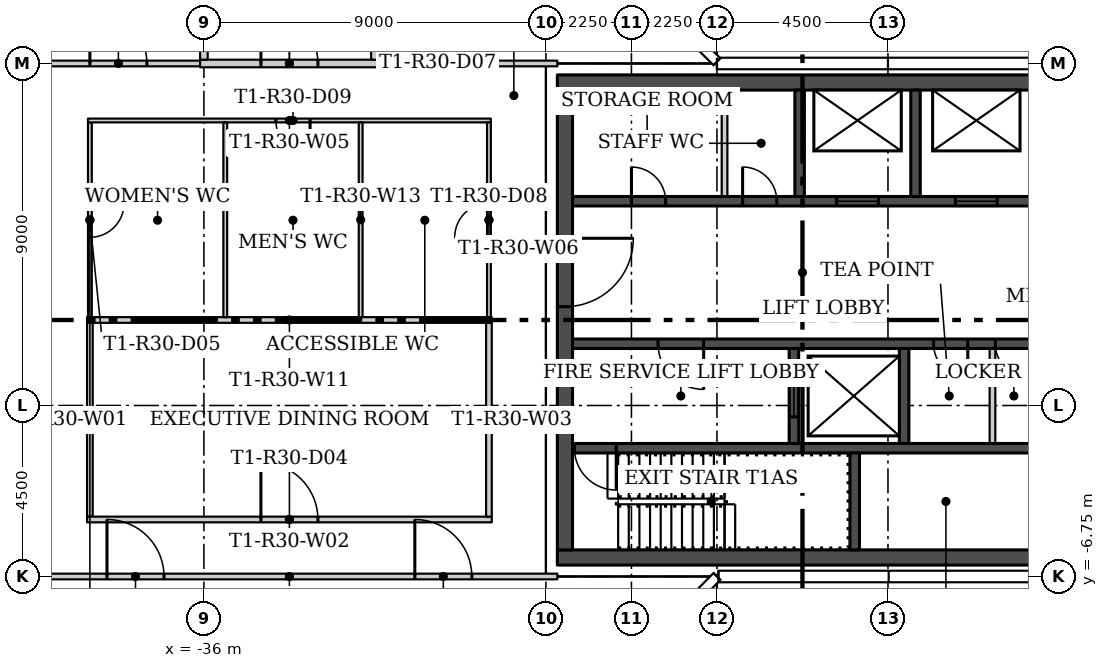
"""IFC4 building model, lengths in metres.
Left out: names, types, materials, properties, quantities, classifications, styles, units other than length and angle.
Written with IfcOpenShell. Run it as: python <this file> out.ifc"""

import sys

from ifc_helpers import new_model, si_unit, direction, frame, frame_2d, origin, place, context, subcontext, project, spatial, rectangle, extrude, element, fill, save


model = new_model("IFC4")
c1 = context("Model", 3, precision=1e-05, world=origin(), true_north=direction((0.0, 1.0)))
c2 = subcontext(c1, "Body", "Model", "MODEL_VIEW")
j1 = project(units=[si_unit("LENGTHUNIT", "METRE"), si_unit("PLANEANGLEUNIT", "RADIAN")], contexts=[c1])
p1 = place(None, origin())
s1 = spatial("IfcSite", under=j1, at=p1, CompositionType="ELEMENT")
p2 = place(p1, origin())
s2 = spatial("IfcBuilding", under=s1, at=p2, CompositionType="ELEMENT")
p3 = place(p2, frame((0.0, 0.0, 269.4)))
s3 = spatial("IfcBuildingStorey", under=s2, at=p3, CompositionType="ELEMENT", Elevation=269.4)
p4 = place(p3, frame((-39.0, -0.075, 0.0), z_axis=(0.0, 0.0, 1.0), x_axis=(0.0, -1.0, 0.0)))
e1 = element("IfcWall", 1, at=p4, inside=s3, PredefinedType="PARTITIONING", context=c2, shape_type="SweptSolid", body=[
    extrude(rectangle(XDim=5.1, YDim=0.15, at=frame_2d((2.55, 0.0))), origin(), (0.0, 0.0, 1.0), 3.45),
])
p5 = place(p3, frame((-39.075, -5.25, 0.0)))
e2 = element("IfcWall", 2, at=p5, inside=s3, PredefinedType="PARTITIONING", context=c2, shape_type="SweptSolid", body=[
    extrude(rectangle(XDim=10.65, YDim=0.15, at=frame_2d((5.325, 0.0))), origin(), (0.0, 0.0, 1.0), 3.45),
])
p6 = place(p5, frame((4.575, 0.0, 0.0)))
e3 = element("IfcOpeningElement", 3, at=p6, cuts=e2, PredefinedType="OPENING", context=c2, shape_type="SweptSolid", body=[
    extrude(rectangle(XDim=1.5, YDim=2.1, at=frame_2d((0.75, 1.05))), frame((0.0, 0.085, 0.0), z_axis=(0.0, -1.0, 0.0), x_axis=(1.0, 0.0, 0.0)), (0.0, 0.0, 1.0), 0.17),
])
p7 = place(p3, frame((-28.5, -5.175, 0.0), z_axis=(0.0, 0.0, 1.0), x_axis=(0.0, 1.0, 0.0)))
e4 = element("IfcWall", 4, at=p7, inside=s3, PredefinedType="PARTITIONING", context=c2, shape_type="SweptSolid", body=[
    extrude(rectangle(XDim=5.1, YDim=0.15, at=frame_2d((2.55, 0.0))), origin(), (0.0, 0.0, 1.0), 3.45),
])
p8 = place(p3, frame((-39.0, 5.2, 0.0), z_axis=(0.0, 0.0, 1.0), x_axis=(0.0, -1.0, 0.0)))
e5 = element("IfcWall", 5, at=p8, inside=s3, PredefinedType="PARTITIONING", context=c2, shape_type="SweptSolid", body=[
    extrude(rectangle(XDim=5.125, YDim=0.1, at=frame_2d((2.562, 0.0))), origin(), (0.0, 0.0, 1.0), 3.45),
])
p9 = place(p8, frame((2.125, 0.0, 0.0)))
e6 = element("IfcOpeningElement", 6, at=p9, cuts=e5, PredefinedType="OPENING", context=c2, shape_type="SweptSolid", body=[
    extrude(rectangle(XDim=0.9, YDim=2.1, at=frame_2d((0.45, 1.05))), frame((0.0, 0.06, 0.0), z_axis=(0.0, -1.0, 0.0), x_axis=(1.0, 0.0, 0.0)), (0.0, 0.0, 1.0), 0.12),
])
p10 = place(p3, frame((-28.45, 5.25, 0.0), z_axis=(0.0, 0.0, 1.0), x_axis=(-1.0, 0.0, 0.0)))
e7 = element("IfcWall", 7, at=p10, inside=s3, PredefinedType="PARTITIONING", context=c2, shape_type="SweptSolid", body=[
    extrude(rectangle(XDim=10.6, YDim=0.1, at=frame_2d((5.3, 0.0))), origin(), (0.0, 0.0, 1.0), 3.45),
])
p11 = place(p10, frame((4.756, 0.0, 0.0)))
e8 = element("IfcOpeningElement", 8, at=p11, cuts=e7, PredefinedType="OPENING", context=c2, shape_type="SweptSolid", body=[
    extrude(rectangle(XDim=0.9, YDim=2.1, at=frame_2d((0.45, 1.05))), frame((0.0, 0.06, 0.0), z_axis=(0.0, -1.0, 0.0), x_axis=(1.0, 0.0, 0.0)), (0.0, 0.0, 1.0), 0.12),
])
p12 = place(p3, frame((-28.5, 0.075, 0.0), z_axis=(0.0, 0.0, 1.0), x_axis=(0.0, 1.0, 0.0)))
e9 = element("IfcWall", 9, at=p12, inside=s3, PredefinedType="PARTITIONING", context=c2, shape_type="SweptSolid", body=[
    extrude(rectangle(XDim=5.125, YDim=0.1, at=frame_2d((2.562, 0.0))), origin(), (0.0, 0.0, 1.0), 3.45),
])
p13 = place(p12, frame((2.1, 0.0, 0.0)))
e10 = element("IfcOpeningElement", 10, at=p13, cuts=e9, PredefinedType="OPENING", context=c2, shape_type="SweptSolid", body=[
    extrude(rectangle(XDim=0.9, YDim=2.1, at=frame_2d((0.45, 1.05))), frame((0.0, 0.06, 0.0), z_axis=(0.0, -1.0, 0.0), x_axis=(1.0, 0.0, 0.0)), (0.0, 0.0, 1.0), 0.12),
])
p14 = place(p3, frame((-40.8, 6.75, 0.0)))
e11 = element("IfcWall", 11, at=p14, inside=s3, PredefinedType="PARTITIONING", context=c2, shape_type="SweptSolid", body=[
    extrude(rectangle(XDim=4.9, YDim=0.15, at=frame_2d((2.45, 0.0))), origin(), (0.0, 0.0, 1.0), 3.45),
])
p15 = place(p14, frame((1.8, 0.0, 0.0)))
e12 = element("IfcOpeningElement", 12, at=p15, cuts=e11, PredefinedType="OPENING", context=c2, shape_type="SweptSolid", body=[
    extrude(rectangle(XDim=1.5, YDim=2.1, at=frame_2d((0.75, 1.05))), frame((0.0, 0.085, 0.0), z_axis=(0.0, -1.0, 0.0), x_axis=(1.0, 0.0, 0.0)), (0.0, 0.0, 1.0), 0.17),
])
p16 = place(p3, frame((-31.6, 6.75, 0.0)))
e13 = element("IfcWall", 13, at=p16, inside=s3, PredefinedType="PARTITIONING", context=c2, shape_type="SweptSolid", body=[
    extrude(rectangle(XDim=4.9, YDim=0.15, at=frame_2d((2.45, 0.0))), origin(), (0.0, 0.0, 1.0), 3.45),
])
p17 = place(p16, frame((1.85, 0.0, 0.0)))
e14 = element("IfcOpeningElement", 14, at=p17, cuts=e13, PredefinedType="OPENING", context=c2, shape_type="SweptSolid", body=[
    extrude(rectangle(XDim=1.0, YDim=2.4, at=frame_2d((0.5, 1.2))), frame((0.0, 0.085, 0.0), z_axis=(0.0, -1.0, 0.0), x_axis=(1.0, 0.0, 0.0)), (0.0, 0.0, 1.0), 0.17),
])
p18 = place(p3, frame((-36.1, 6.75, 0.0)))
e15 = element("IfcWall", 15, at=p18, inside=s3, PredefinedType="PARTITIONING", context=c2, shape_type="SweptSolid", body=[
    extrude(rectangle(XDim=4.7, YDim=0.2, at=frame_2d((2.35, 0.0))), origin(), (0.0, 0.0, 1.0), 3.45),
])
p19 = place(p18, frame((1.6, 0.0, 0.0)))
e16 = element("IfcOpeningElement", 16, at=p19, cuts=e15, PredefinedType="OPENING", context=c2, shape_type="SweptSolid", body=[
    extrude(rectangle(XDim=1.5, YDim=2.4, at=frame_2d((0.75, 1.2))), frame((0.0, 0.11, 0.0), z_axis=(0.0, -1.0, 0.0), x_axis=(1.0, 0.0, 0.0)), (0.0, 0.0, 1.0), 0.22),
])
p20 = place(p3, frame((-40.8, -6.75, 0.0)))
e17 = element("IfcWall", 17, at=p20, inside=s3, PredefinedType="PARTITIONING", context=c2, shape_type="SweptSolid", body=[
    extrude(rectangle(XDim=14.1, YDim=0.15, at=frame_2d((7.05, 0.0))), origin(), (0.0, 0.0, 1.0), 3.45),
])
p21 = place(p20, frame((2.25, 0.0, 0.0)))
e18 = element("IfcOpeningElement", 18, at=p21, cuts=e17, PredefinedType="OPENING", context=c2, shape_type="SweptSolid", body=[
    extrude(rectangle(XDim=1.5, YDim=2.1, at=frame_2d((0.75, 1.05))), frame((0.0, 0.085, 0.0), z_axis=(0.0, -1.0, 0.0), x_axis=(1.0, 0.0, 0.0)), (0.0, 0.0, 1.0), 0.17),
])
p22 = place(p20, frame((10.35, 0.0, 0.0)))
e19 = element("IfcOpeningElement", 19, at=p22, cuts=e17, PredefinedType="OPENING", context=c2, shape_type="SweptSolid", body=[
    extrude(rectangle(XDim=1.5, YDim=2.1, at=frame_2d((0.75, 1.05))), frame((0.0, 0.085, 0.0), z_axis=(0.0, -1.0, 0.0), x_axis=(1.0, 0.0, 0.0)), (0.0, 0.0, 1.0), 0.17),
])
p23 = place(p3, frame((-28.425, 0.0, 0.0), z_axis=(0.0, 0.0, 1.0), x_axis=(-1.0, 0.0, 0.0)))
e20 = element("IfcWall", 20, at=p23, inside=s3, PredefinedType="PARTITIONING", context=c2, shape_type="SweptSolid", body=[
    extrude(rectangle(XDim=10.65, YDim=0.15, at=frame_2d((5.325, 0.0))), origin(), (0.0, 0.0, 1.0), 3.45),
])
for number, where, z_axis, x_axis in (
    (21, (-35.438, 0.075, 0.0), (0.0, 0.0, 1.0), (0.0, 1.0, 0.0)),
    (22, (-31.875, 0.075, 0.0), (0.0, 0.0, 1.0), (0.0, 1.0, 0.0)),
):
    element("IfcWall", number, at=place(p3, frame(where, z_axis=z_axis, x_axis=x_axis)), inside=s3, PredefinedType="PARTITIONING", context=c2, shape_type="SweptSolid", body=[
        extrude(rectangle(XDim=5.125, YDim=0.1, at=frame_2d((2.562, 0.0))), origin(), (0.0, 0.0, 1.0), 3.45),
    ])
for number, where, z_axis, x_axis in (
    (23, (-36.0, 6.85, 0.0), (0.0, 0.0, 1.0), (0.0, 1.0, 0.0)),
    (24, (-31.5, 6.85, 0.0), (0.0, 0.0, 1.0), (0.0, 1.0, 0.0)),
):
    element("IfcWall", number, at=place(p3, frame(where, z_axis=z_axis, x_axis=x_axis)), inside=s3, PredefinedType="PARTITIONING", context=c2, shape_type="SweptSolid", body=[
        extrude(rectangle(XDim=8.805, YDim=0.2, at=frame_2d((4.402, 0.0))), origin(), (0.0, 0.0, 1.0), 3.45),
    ])
for number, where in (
    (25, (-26.7, -6.25, 0.0)),
    (26, (-26.7, 6.25, 0.0)),
):
    element("IfcWall", number, at=place(p3, frame(where)), inside=s3, PredefinedType="SHEAR", context=c2, shape_type="SweptSolid", body=[
        extrude(rectangle(XDim=12.9, YDim=0.4, at=frame_2d((6.45, 0.0))), origin(), (0.0, 0.0, 1.0), 3.45),
    ])
p24 = place(p3, frame((-26.5, 6.05, 0.0), z_axis=(0.0, 0.0, 1.0), x_axis=(0.0, -1.0, 0.0)))
e27 = element("IfcWall", 27, at=p24, inside=s3, PredefinedType="SHEAR", context=c2, shape_type="SweptSolid", body=[
    extrude(rectangle(XDim=12.1, YDim=0.4, at=frame_2d((6.05, 0.0))), origin(), (0.0, 0.0, 1.0), 3.45),
])
p25 = place(p24, frame((3.9, 0.0, 0.0)))
e28 = element("IfcOpeningElement", 28, at=p25, cuts=e27, PredefinedType="OPENING", context=c2, shape_type="SweptSolid", body=[
    extrude(rectangle(XDim=1.8, YDim=2.4, at=frame_2d((0.9, 1.2))), frame((0.0, 0.21, 0.0), z_axis=(0.0, -1.0, 0.0), x_axis=(1.0, 0.0, 0.0)), (0.0, 0.0, 1.0), 0.42),
])
p26 = place(p3, frame((-14.2, -3.375, 0.0), z_axis=(0.0, 0.0, 1.0), x_axis=(-1.0, 0.0, 0.0)))
e29 = element("IfcWall", 29, at=p26, inside=s3, PredefinedType="SHEAR", context=c2, shape_type="SweptSolid", body=[
    extrude(rectangle(XDim=12.1, YDim=0.25, at=frame_2d((6.05, 0.0))), origin(), (0.0, 0.0, 1.0), 3.45),
])
p27 = place(p26, frame((10.95, 0.0, 0.0)))
e30 = element("IfcOpeningElement", 30, at=p27, cuts=e29, PredefinedType="OPENING", context=c2, shape_type="SweptSolid", body=[
    extrude(rectangle(XDim=1.1, YDim=2.1, at=frame_2d((0.55, 1.05))), frame((0.0, 0.135, 0.0), z_axis=(0.0, -1.0, 0.0), x_axis=(1.0, 0.0, 0.0)), (0.0, 0.0, 1.0), 0.27),
])
p28 = place(p3, frame((-18.875, -6.05, 0.0), z_axis=(0.0, 0.0, 1.0), x_axis=(0.0, 1.0, 0.0)))
e31 = element("IfcWall", 31, at=p28, inside=s3, PredefinedType="SHEAR", context=c2, shape_type="SweptSolid", body=[
    extrude(rectangle(XDim=2.55, YDim=0.25, at=frame_2d((1.275, 0.0))), origin(), (0.0, 0.0, 1.0), 3.45),
])
p29 = place(p3, frame((-14.2, -0.625, 0.0), z_axis=(0.0, 0.0, 1.0), x_axis=(-1.0, 0.0, 0.0)))
e32 = element("IfcWall", 32, at=p29, inside=s3, PredefinedType="SHEAR", context=c2, shape_type="SweptSolid", body=[
    extrude(rectangle(XDim=12.1, YDim=0.25, at=frame_2d((6.05, 0.0))), origin(), (0.0, 0.0, 1.0), 3.45),
])
p30 = place(p29, frame((8.65, 0.0, 0.0)))
e33 = element("IfcOpeningElement", 33, at=p30, cuts=e32, PredefinedType="OPENING", context=c2, shape_type="SweptSolid", body=[
    extrude(rectangle(XDim=1.2, YDim=2.1, at=frame_2d((0.6, 1.05))), frame((0.0, 0.135, 0.0), z_axis=(0.0, -1.0, 0.0), x_axis=(1.0, 0.0, 0.0)), (0.0, 0.0, 1.0), 0.27),
])
p31 = place(p29, frame((1.7, 0.0, 0.0)))
e34 = element("IfcOpeningElement", 34, at=p31, cuts=e32, PredefinedType="OPENING", context=c2, shape_type="SweptSolid", body=[
    extrude(rectangle(XDim=0.9, YDim=2.1, at=frame_2d((0.45, 1.05))), frame((0.0, 0.135, 0.0), z_axis=(0.0, -1.0, 0.0), x_axis=(1.0, 0.0, 0.0)), (0.0, 0.0, 1.0), 0.27),
])
p32 = place(p29, frame((0.075, 0.0, 0.0)))
e35 = element("IfcOpeningElement", 35, at=p32, cuts=e32, PredefinedType="OPENING", context=c2, shape_type="SweptSolid", body=[
    extrude(rectangle(XDim=0.9, YDim=2.1, at=frame_2d((0.45, 1.05))), frame((0.0, 0.135, 0.0), z_axis=(0.0, -1.0, 0.0), x_axis=(1.0, 0.0, 0.0)), (0.0, 0.0, 1.0), 0.27),
])
p33 = place(p3, frame((-20.475, -3.25, 0.0), z_axis=(0.0, 0.0, 1.0), x_axis=(0.0, 1.0, 0.0)))
e36 = element("IfcWall", 36, at=p33, inside=s3, PredefinedType="SHEAR", context=c2, shape_type="SweptSolid", body=[
    extrude(rectangle(XDim=2.5, YDim=0.25, at=frame_2d((1.25, 0.0))), origin(), (0.0, 0.0, 1.0), 3.45),
])
p34 = place(p33, frame((0.7, 0.0, 0.0)))
e37 = element("IfcOpeningElement", 37, at=p34, cuts=e36, PredefinedType="OPENING", context=c2, shape_type="SweptSolid", body=[
    extrude(rectangle(XDim=1.1, YDim=2.1, at=frame_2d((0.55, 1.05))), frame((0.0, 0.135, 0.0), z_axis=(0.0, -1.0, 0.0), x_axis=(1.0, 0.0, 0.0)), (0.0, 0.0, 1.0), 0.27),
])
p35 = place(p3, frame((-17.575, -3.25, 0.0), z_axis=(0.0, 0.0, 1.0), x_axis=(0.0, 1.0, 0.0)))
e38 = element("IfcWall", 38, at=p35, inside=s3, PredefinedType="SHEAR", context=c2, shape_type="SweptSolid", body=[
    extrude(rectangle(XDim=2.5, YDim=0.25, at=frame_2d((1.25, 0.0))), origin(), (0.0, 0.0, 1.0), 3.45),
])
p36 = place(p3, frame((-15.25, -3.25, 0.0), z_axis=(0.0, 0.0, 1.0), x_axis=(0.0, 1.0, 0.0)))
e39 = element("IfcWall", 39, at=p36, inside=s3, PredefinedType="PARTITIONING", context=c2, shape_type="SweptSolid", body=[
    extrude(rectangle(XDim=2.5, YDim=0.15, at=frame_2d((1.25, 0.0))), origin(), (0.0, 0.0, 1.0), 3.45),
])
p37 = place(p3, frame((-26.3, 3.125, 0.0)))
e40 = element("IfcWall", 40, at=p37, inside=s3, PredefinedType="SHEAR", context=c2, shape_type="SweptSolid", body=[
    extrude(rectangle(XDim=12.1, YDim=0.25, at=frame_2d((6.05, 0.0))), origin(), (0.0, 0.0, 1.0), 3.45),
])
p38 = place(p37, frame((6.95, 0.0, 0.0)))
e41 = element("IfcOpeningElement", 41, at=p38, cuts=e40, PredefinedType="OPENING", context=c2, shape_type="SweptSolid", body=[
    extrude(rectangle(XDim=1.1, YDim=2.1, at=frame_2d((0.55, 1.05))), frame((0.0, 0.135, 0.0), z_axis=(0.0, -1.0, 0.0), x_axis=(1.0, 0.0, 0.0)), (0.0, 0.0, 1.0), 0.27),
])
p39 = place(p37, frame((10.075, 0.0, 0.0)))
e42 = element("IfcOpeningElement", 42, at=p39, cuts=e40, PredefinedType="OPENING", context=c2, shape_type="SweptSolid", body=[
    extrude(rectangle(XDim=1.1, YDim=2.1, at=frame_2d((0.55, 1.05))), frame((0.0, 0.135, 0.0), z_axis=(0.0, -1.0, 0.0), x_axis=(1.0, 0.0, 0.0)), (0.0, 0.0, 1.0), 0.27),
])
p40 = place(p37, frame((1.55, 0.0, 0.0)))
e43 = element("IfcOpeningElement", 43, at=p40, cuts=e40, PredefinedType="OPENING", context=c2, shape_type="SweptSolid", body=[
    extrude(rectangle(XDim=0.9, YDim=2.1, at=frame_2d((0.45, 1.05))), frame((0.0, 0.135, 0.0), z_axis=(0.0, -1.0, 0.0), x_axis=(1.0, 0.0, 0.0)), (0.0, 0.0, 1.0), 0.27),
])
p41 = place(p37, frame((4.475, 0.0, 0.0)))
e44 = element("IfcOpeningElement", 44, at=p41, cuts=e40, PredefinedType="OPENING", context=c2, shape_type="SweptSolid", body=[
    extrude(rectangle(XDim=0.9, YDim=2.1, at=frame_2d((0.45, 1.05))), frame((0.0, 0.135, 0.0), z_axis=(0.0, -1.0, 0.0), x_axis=(1.0, 0.0, 0.0)), (0.0, 0.0, 1.0), 0.27),
])
for number, where, z_axis, x_axis in (
    (45, (-20.325, 3.25, 0.0), (0.0, 0.0, 1.0), (0.0, 1.0, 0.0)),
    (46, (-17.275, 3.25, 0.0), (0.0, 0.0, 1.0), (0.0, 1.0, 0.0)),
):
    element("IfcWall", number, at=place(p3, frame(where, z_axis=z_axis, x_axis=x_axis)), inside=s3, PredefinedType="SHEAR", context=c2, shape_type="SweptSolid", body=[
        extrude(rectangle(XDim=2.8, YDim=0.25, at=frame_2d((1.4, 0.0))), origin(), (0.0, 0.0, 1.0), 3.45),
    ])
p42 = place(p3, frame((-22.3, 3.25, 0.0), z_axis=(0.0, 0.0, 1.0), x_axis=(0.0, 1.0, 0.0)))
e47 = element("IfcWall", 47, at=p42, inside=s3, PredefinedType="PARTITIONING", context=c2, shape_type="SweptSolid", body=[
    extrude(rectangle(XDim=2.8, YDim=0.15, at=frame_2d((1.4, 0.0))), origin(), (0.0, 0.0, 1.0), 3.45),
])
p43 = place(p21, origin())
e48 = element("IfcDoor", 48, at=p43, inside=s3, OperationType="DOUBLE_DOOR_SINGLE_SWING", PredefinedType="DOOR", context=c2, shape_type="SweptSolid", body=[
    extrude(rectangle(XDim=1.5, YDim=2.1, at=frame_2d((0.75, 1.05))), frame((0.0, 0.025, 0.0), z_axis=(0.0, -1.0, 0.0), x_axis=(1.0, 0.0, 0.0)), (0.0, 0.0, 1.0), 0.05),
])
fill(e18, e48)
p44 = place(p22, origin())
e49 = element("IfcDoor", 49, at=p44, inside=s3, OperationType="DOUBLE_DOOR_SINGLE_SWING", PredefinedType="DOOR", context=c2, shape_type="SweptSolid", body=[
    extrude(rectangle(XDim=1.5, YDim=2.1, at=frame_2d((0.75, 1.05))), frame((0.0, 0.025, 0.0), z_axis=(0.0, -1.0, 0.0), x_axis=(1.0, 0.0, 0.0)), (0.0, 0.0, 1.0), 0.05),
])
fill(e19, e49)
p45 = place(p15, origin())
e50 = element("IfcDoor", 50, at=p45, inside=s3, OperationType="DOUBLE_DOOR_SINGLE_SWING", PredefinedType="DOOR", context=c2, shape_type="SweptSolid", body=[
    extrude(rectangle(XDim=1.5, YDim=2.1, at=frame_2d((0.75, 1.05))), frame((0.0, 0.025, 0.0), z_axis=(0.0, -1.0, 0.0), x_axis=(1.0, 0.0, 0.0)), (0.0, 0.0, 1.0), 0.05),
])
fill(e12, e50)
p46 = place(p6, origin())
e51 = element("IfcDoor", 51, at=p46, inside=s3, OperationType="DOUBLE_DOOR_SINGLE_SWING", PredefinedType="DOOR", context=c2, shape_type="SweptSolid", body=[
    extrude(rectangle(XDim=1.5, YDim=2.1, at=frame_2d((0.75, 1.05))), frame((0.0, 0.025, 0.0), z_axis=(0.0, -1.0, 0.0), x_axis=(1.0, 0.0, 0.0)), (0.0, 0.0, 1.0), 0.05),
])
fill(e3, e51)
p47 = place(p9, origin())
e52 = element("IfcDoor", 52, at=p47, inside=s3, OperationType="SINGLE_SWING_LEFT", PredefinedType="DOOR", context=c2, shape_type="SweptSolid", body=[
    extrude(rectangle(XDim=0.9, YDim=2.1, at=frame_2d((0.45, 1.05))), frame((0.0, 0.025, 0.0), z_axis=(0.0, -1.0, 0.0), x_axis=(1.0, 0.0, 0.0)), (0.0, 0.0, 1.0), 0.05),
])
fill(e6, e52)
p48 = place(p19, origin())
e53 = element("IfcDoor", 53, at=p48, inside=s3, OperationType="DOUBLE_DOOR_SINGLE_SWING", PredefinedType="DOOR", context=c2, shape_type="SweptSolid", body=[
    extrude(rectangle(XDim=1.5, YDim=2.4, at=frame_2d((0.75, 1.2))), frame((0.0, 0.025, 0.0), z_axis=(0.0, -1.0, 0.0), x_axis=(1.0, 0.0, 0.0)), (0.0, 0.0, 1.0), 0.05),
])
fill(e16, e53)
p49 = place(p17, origin())
e54 = element("IfcDoor", 54, at=p49, inside=s3, OperationType="SINGLE_SWING_RIGHT", PredefinedType="DOOR", context=c2, shape_type="SweptSolid", body=[
    extrude(rectangle(XDim=1.0, YDim=2.4, at=frame_2d((0.5, 1.2))), frame((0.0, 0.025, 0.0), z_axis=(0.0, -1.0, 0.0), x_axis=(1.0, 0.0, 0.0)), (0.0, 0.0, 1.0), 0.05),
])
fill(e14, e54)
p50 = place(p13, origin())
e55 = element("IfcDoor", 55, at=p50, inside=s3, OperationType="SINGLE_SWING_RIGHT", PredefinedType="DOOR", context=c2, shape_type="SweptSolid", body=[
    extrude(rectangle(XDim=0.9, YDim=2.1, at=frame_2d((0.45, 1.05))), frame((0.0, 0.025, 0.0), z_axis=(0.0, -1.0, 0.0), x_axis=(1.0, 0.0, 0.0)), (0.0, 0.0, 1.0), 0.05),
])
fill(e10, e55)
p51 = place(p11, origin())
e56 = element("IfcDoor", 56, at=p51, inside=s3, OperationType="SINGLE_SWING_LEFT", PredefinedType="DOOR", context=c2, shape_type="SweptSolid", body=[
    extrude(rectangle(XDim=0.9, YDim=2.1, at=frame_2d((0.45, 1.05))), frame((0.0, 0.025, 0.0), z_axis=(0.0, -1.0, 0.0), x_axis=(1.0, 0.0, 0.0)), (0.0, 0.0, 1.0), 0.05),
])
fill(e8, e56)
p52 = place(p25, origin())
e57 = element("IfcDoor", 57, at=p52, inside=s3, OperationType="DOUBLE_DOOR_SINGLE_SWING", PredefinedType="DOOR", context=c2, shape_type="SweptSolid", body=[
    extrude(rectangle(XDim=1.8, YDim=2.4, at=frame_2d((0.9, 1.2))), frame((0.0, 0.025, 0.0), z_axis=(0.0, -1.0, 0.0), x_axis=(1.0, 0.0, 0.0)), (0.0, 0.0, 1.0), 0.05),
])
fill(e28, e57)
p53 = place(p27, origin())
e58 = element("IfcDoor", 58, at=p53, inside=s3, OperationType="SINGLE_SWING_RIGHT", PredefinedType="DOOR", context=c2, shape_type="SweptSolid", body=[
    extrude(rectangle(XDim=1.1, YDim=2.1, at=frame_2d((0.55, 1.05))), frame((0.0, 0.025, 0.0), z_axis=(0.0, -1.0, 0.0), x_axis=(1.0, 0.0, 0.0)), (0.0, 0.0, 1.0), 0.05),
])
fill(e30, e58)
p54 = place(p30, origin())
e59 = element("IfcDoor", 59, at=p54, inside=s3, OperationType="SINGLE_SWING_RIGHT", PredefinedType="DOOR", context=c2, shape_type="SweptSolid", body=[
    extrude(rectangle(XDim=1.2, YDim=2.1, at=frame_2d((0.6, 1.05))), frame((0.0, 0.025, 0.0), z_axis=(0.0, -1.0, 0.0), x_axis=(1.0, 0.0, 0.0)), (0.0, 0.0, 1.0), 0.05),
])
fill(e33, e59)
p55 = place(p31, origin())
e60 = element("IfcDoor", 60, at=p55, inside=s3, OperationType="SINGLE_SWING_LEFT", PredefinedType="DOOR", context=c2, shape_type="SweptSolid", body=[
    extrude(rectangle(XDim=0.9, YDim=2.1, at=frame_2d((0.45, 1.05))), frame((0.0, 0.025, 0.0), z_axis=(0.0, -1.0, 0.0), x_axis=(1.0, 0.0, 0.0)), (0.0, 0.0, 1.0), 0.05),
])
fill(e34, e60)
p56 = place(p32, origin())
e61 = element("IfcDoor", 61, at=p56, inside=s3, OperationType="SINGLE_SWING_LEFT", PredefinedType="DOOR", context=c2, shape_type="SweptSolid", body=[
    extrude(rectangle(XDim=0.9, YDim=2.1, at=frame_2d((0.45, 1.05))), frame((0.0, 0.025, 0.0), z_axis=(0.0, -1.0, 0.0), x_axis=(1.0, 0.0, 0.0)), (0.0, 0.0, 1.0), 0.05),
])
fill(e35, e61)
p57 = place(p34, origin())
e62 = element("IfcDoor", 62, at=p57, inside=s3, OperationType="SLIDING_TO_LEFT", PredefinedType="DOOR", context=c2, shape_type="SweptSolid", body=[
    extrude(rectangle(XDim=1.1, YDim=2.1, at=frame_2d((0.55, 1.05))), frame((0.0, 0.025, 0.0), z_axis=(0.0, -1.0, 0.0), x_axis=(1.0, 0.0, 0.0)), (0.0, 0.0, 1.0), 0.05),
])
fill(e37, e62)
p58 = place(p38, origin())
e63 = element("IfcDoor", 63, at=p58, inside=s3, OperationType="SLIDING_TO_LEFT", PredefinedType="DOOR", context=c2, shape_type="SweptSolid", body=[
    extrude(rectangle(XDim=1.1, YDim=2.1, at=frame_2d((0.55, 1.05))), frame((0.0, 0.025, 0.0), z_axis=(0.0, -1.0, 0.0), x_axis=(1.0, 0.0, 0.0)), (0.0, 0.0, 1.0), 0.05),
])
fill(e41, e63)
p59 = place(p39, origin())
e64 = element("IfcDoor", 64, at=p59, inside=s3, OperationType="SLIDING_TO_LEFT", PredefinedType="DOOR", context=c2, shape_type="SweptSolid", body=[
    extrude(rectangle(XDim=1.1, YDim=2.1, at=frame_2d((0.55, 1.05))), frame((0.0, 0.025, 0.0), z_axis=(0.0, -1.0, 0.0), x_axis=(1.0, 0.0, 0.0)), (0.0, 0.0, 1.0), 0.05),
])
fill(e42, e64)
p60 = place(p40, origin())
e65 = element("IfcDoor", 65, at=p60, inside=s3, OperationType="SINGLE_SWING_LEFT", PredefinedType="DOOR", context=c2, shape_type="SweptSolid", body=[
    extrude(rectangle(XDim=0.9, YDim=2.1, at=frame_2d((0.45, 1.05))), frame((0.0, 0.025, 0.0), z_axis=(0.0, -1.0, 0.0), x_axis=(1.0, 0.0, 0.0)), (0.0, 0.0, 1.0), 0.05),
])
fill(e43, e65)
p61 = place(p41, origin())
e66 = element("IfcDoor", 66, at=p61, inside=s3, OperationType="SINGLE_SWING_LEFT", PredefinedType="DOOR", context=c2, shape_type="SweptSolid", body=[
    extrude(rectangle(XDim=0.9, YDim=2.1, at=frame_2d((0.45, 1.05))), frame((0.0, 0.025, 0.0), z_axis=(0.0, -1.0, 0.0), x_axis=(1.0, 0.0, 0.0)), (0.0, 0.0, 1.0), 0.05),
])
fill(e44, e66)
save(model, sys.argv[1])
